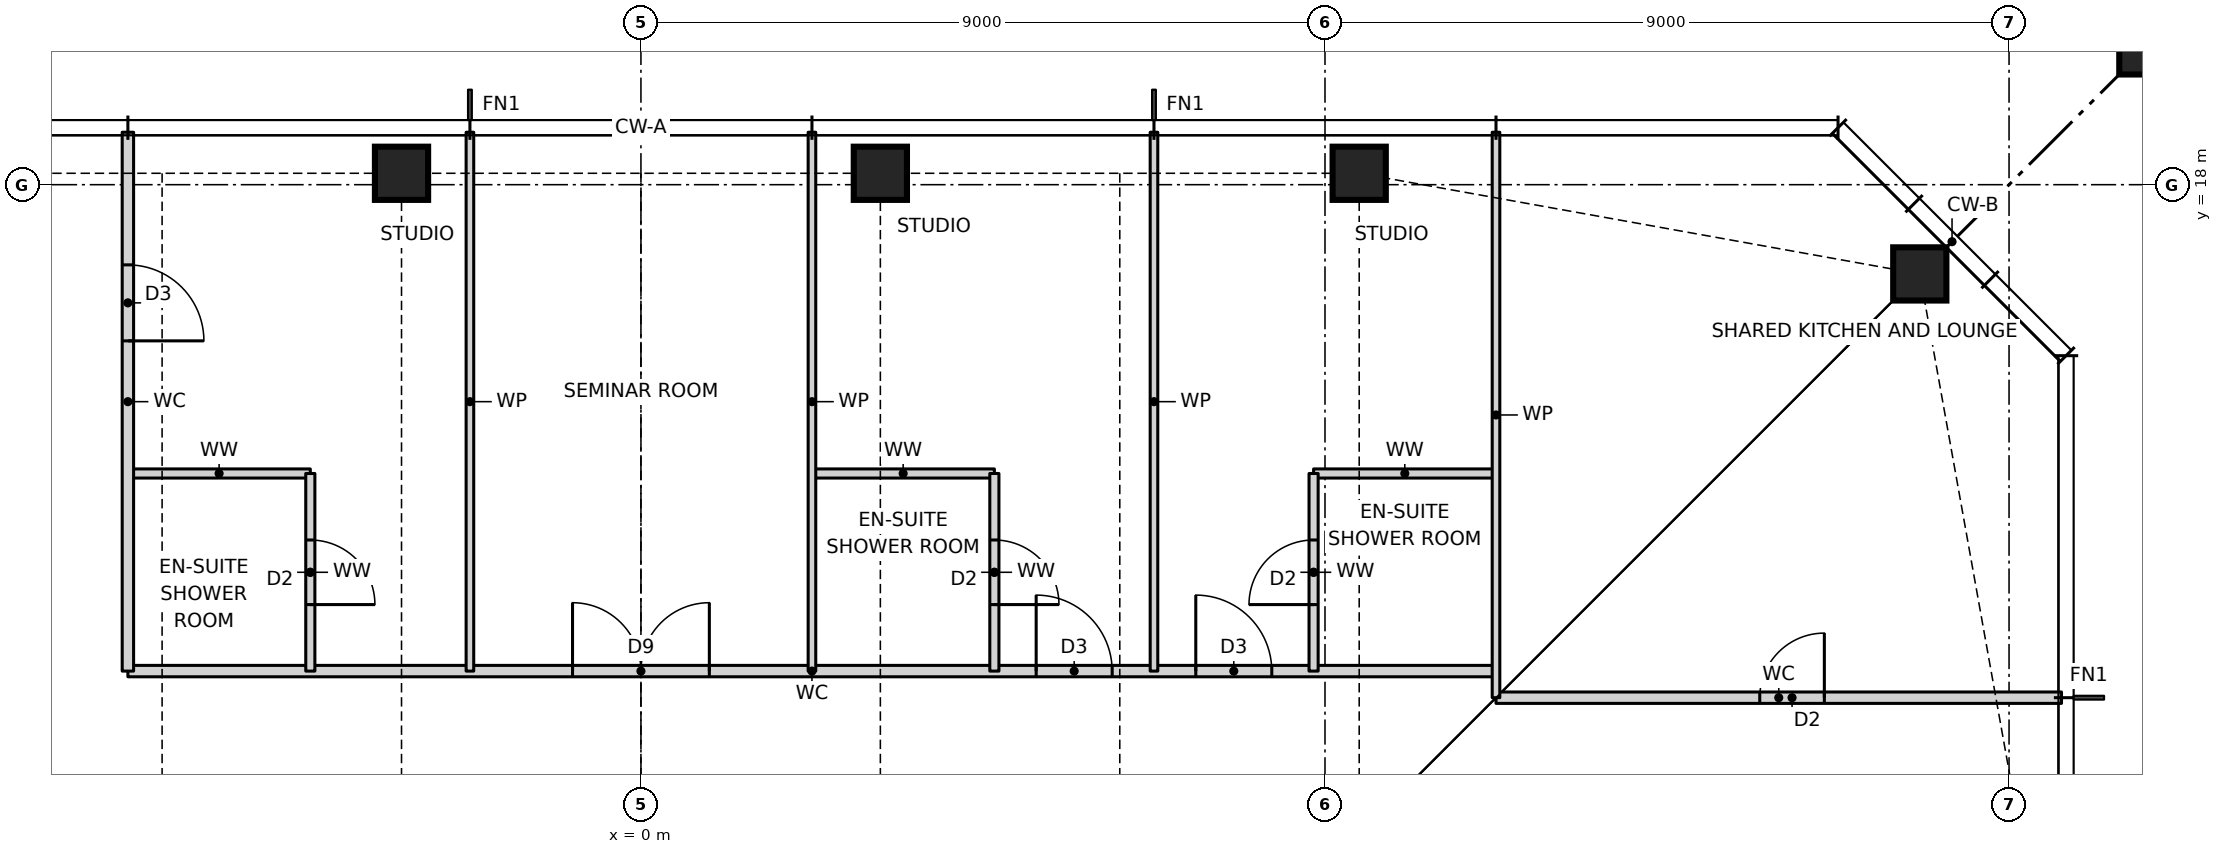
"""IFC4 building model, lengths in metres.
Left out: names, types, materials, properties, quantities, classifications, styles, units other than length and angle.
Written with IfcOpenShell. Run it as: python <this file> out.ifc"""

import sys

from ifc_helpers import new_model, si_unit, direction, frame, frame_2d, origin, origin_2d, place, context, subcontext, project, spatial, rectangle, hollow_rectangle, i_section, extrude, element, fill, save


model = new_model("IFC4")
c1 = context("Model", 3, precision=1e-05, world=origin(), true_north=direction((0.0, 1.0)))
c2 = subcontext(c1, "Body", "Model", "MODEL_VIEW")
j1 = project(units=[si_unit("LENGTHUNIT", "METRE"), si_unit("PLANEANGLEUNIT", "RADIAN")], contexts=[c1])
p1 = place(None, origin())
s1 = spatial("IfcSite", under=j1, at=p1, CompositionType="ELEMENT")
p2 = place(p1, origin())
s2 = spatial("IfcBuilding", under=s1, at=p2, CompositionType="ELEMENT")
p3 = place(p2, frame((0.0, 0.0, 153.0)))
s3 = spatial("IfcBuildingStorey", under=s2, at=p3, CompositionType="ELEMENT", Elevation=153.0)
for number, where, z_axis, x_axis in (
    (1, (16.826, 16.826, 0.0), (0.0, 0.0, 1.0), (1.0, 0.0, 0.0)),
    (2, (9.45, 18.15, 0.0), (0.0, 0.0, 1.0), (1.0, 0.0, 0.0)),
    (3, (3.15, 18.15, 0.0), (0.0, 0.0, 1.0), (1.0, 0.0, 0.0)),
    (4, (-3.15, 18.15, 0.0), (0.0, 0.0, 1.0), (1.0, 0.0, 0.0)),
):
    element("IfcColumn", number, at=place(p3, frame(where, z_axis=z_axis, x_axis=x_axis)), inside=s3, PredefinedType="COLUMN", context=c2, shape_type="SweptSolid", body=[
        extrude(hollow_rectangle(XDim=0.7, YDim=0.7, WallThickness=0.06, at=origin_2d()), origin(), (0.0, 0.0, 1.0), 3.5),
    ])
p4 = place(p3, frame((21.65, 21.65, 0.0), z_axis=(0.0, 0.0, 1.0), x_axis=(1.0, 0.0, 0.0)))
e5 = element("IfcColumn", 5, at=p4, inside=s3, PredefinedType="COLUMN", context=c2, shape_type="SweptSolid", body=[
    extrude(rectangle(XDim=4.4, YDim=4.4, at=origin_2d()), origin(), (0.0, 0.0, 1.0), 3.5),
    extrude(i_section(OverallWidth=0.478, OverallDepth=0.599, WebThickness=0.1, FlangeThickness=0.14, at=origin_2d()), origin(), (0.0, 0.0, 1.0), 3.5),
])
p5 = place(p3, frame((11.25, 11.25, 0.0), z_axis=(0.0, 0.0, 1.0), x_axis=(1.0, 0.0, 0.0)))
e6 = element("IfcWall", 6, at=p5, inside=s3, PredefinedType="PARTITIONING", context=c2, shape_type="SweptSolid", body=[
    extrude(rectangle(XDim=7.44, YDim=0.15, at=frame_2d((3.72, 0.0))), origin(), (0.0, 0.0, 1.0), 3.27),
])
p6 = place(p5, frame((3.47, 0.0, 0.0)))
e7 = element("IfcOpeningElement", 7, at=p6, cuts=e6, PredefinedType="OPENING", context=c2, shape_type="SweptSolid", body=[
    extrude(rectangle(XDim=0.85, YDim=2.1, at=frame_2d((0.425, 1.05))), frame((0.0, 0.085, 0.0), z_axis=(0.0, -1.0, 0.0), x_axis=(1.0, 0.0, 0.0)), (0.0, 0.0, 1.0), 0.17),
])
p7 = place(p3, frame((-6.75, 11.6, 0.0), z_axis=(0.0, 0.0, 1.0), x_axis=(1.0, 0.0, 0.0)))
e8 = element("IfcWall", 8, at=p7, inside=s3, PredefinedType="PARTITIONING", context=c2, shape_type="SweptSolid", body=[
    extrude(rectangle(XDim=18.0, YDim=0.15, at=frame_2d((9.0, 0.0))), origin(), (0.0, 0.0, 1.0), 3.27),
])
p8 = place(p7, frame((14.05, 0.0, 0.0)))
e9 = element("IfcOpeningElement", 9, at=p8, cuts=e8, PredefinedType="OPENING", context=c2, shape_type="SweptSolid", body=[
    extrude(rectangle(XDim=1.0, YDim=2.1, at=frame_2d((0.5, 1.05))), frame((0.0, 0.085, 0.0), z_axis=(0.0, -1.0, 0.0), x_axis=(1.0, 0.0, 0.0)), (0.0, 0.0, 1.0), 0.17),
])
p9 = place(p7, frame((11.95, 0.0, 0.0)))
e10 = element("IfcOpeningElement", 10, at=p9, cuts=e8, PredefinedType="OPENING", context=c2, shape_type="SweptSolid", body=[
    extrude(rectangle(XDim=1.0, YDim=2.1, at=frame_2d((0.5, 1.05))), frame((0.0, 0.085, 0.0), z_axis=(0.0, -1.0, 0.0), x_axis=(1.0, 0.0, 0.0)), (0.0, 0.0, 1.0), 0.17),
])
p10 = place(p7, frame((5.85, 0.0, 0.0)))
e11 = element("IfcOpeningElement", 11, at=p10, cuts=e8, PredefinedType="OPENING", context=c2, shape_type="SweptSolid", body=[
    extrude(rectangle(XDim=1.8, YDim=2.1, at=frame_2d((0.9, 1.05))), frame((0.0, 0.085, 0.0), z_axis=(0.0, -1.0, 0.0), x_axis=(1.0, 0.0, 0.0)), (0.0, 0.0, 1.0), 0.17),
])
for number, where, z_axis, x_axis in (
    (12, (-6.75, 14.2, 0.0), (0.0, 0.0, 1.0), (1.0, 0.0, 0.0)),
    (13, (2.25, 14.2, 0.0), (0.0, 0.0, 1.0), (1.0, 0.0, 0.0)),
    (14, (8.85, 14.2, 0.0), (0.0, 0.0, 1.0), (1.0, 0.0, 0.0)),
):
    element("IfcWall", number, at=place(p3, frame(where, z_axis=z_axis, x_axis=x_axis)), inside=s3, PredefinedType="PARTITIONING", context=c2, shape_type="SweptSolid", body=[
        extrude(rectangle(XDim=2.4, YDim=0.12, at=frame_2d((1.2, 0.0))), origin(), (0.0, 0.0, 1.0), 3.27),
    ])
p11 = place(p3, frame((11.25, 11.25, 0.0), z_axis=(0.0, 0.0, 1.0), x_axis=(0.0, 1.0, 0.0)))
e15 = element("IfcWall", 15, at=p11, inside=s3, PredefinedType="PARTITIONING", context=c2, shape_type="SweptSolid", body=[
    extrude(rectangle(XDim=7.44, YDim=0.1, at=frame_2d((3.72, 0.0))), origin(), (0.0, 0.0, 1.0), 3.27),
])
p12 = place(p3, frame((8.85, 11.6, 0.0), z_axis=(0.0, 0.0, 1.0), x_axis=(0.0, 1.0, 0.0)))
e16 = element("IfcWall", 16, at=p12, inside=s3, PredefinedType="PARTITIONING", context=c2, shape_type="SweptSolid", body=[
    extrude(rectangle(XDim=2.6, YDim=0.12, at=frame_2d((1.3, 0.0))), origin(), (0.0, 0.0, 1.0), 3.27),
])
p13 = place(p12, frame((0.875, 0.0, 0.0)))
e17 = element("IfcOpeningElement", 17, at=p13, cuts=e16, PredefinedType="OPENING", context=c2, shape_type="SweptSolid", body=[
    extrude(rectangle(XDim=0.85, YDim=2.1, at=frame_2d((0.425, 1.05))), frame((0.0, 0.07, 0.0), z_axis=(0.0, -1.0, 0.0), x_axis=(1.0, 0.0, 0.0)), (0.0, 0.0, 1.0), 0.14),
])
p14 = place(p3, frame((6.75, 11.6, 0.0), z_axis=(0.0, 0.0, 1.0), x_axis=(0.0, 1.0, 0.0)))
e18 = element("IfcWall", 18, at=p14, inside=s3, PredefinedType="PARTITIONING", context=c2, shape_type="SweptSolid", body=[
    extrude(rectangle(XDim=7.09, YDim=0.1, at=frame_2d((3.545, 0.0))), origin(), (0.0, 0.0, 1.0), 3.27),
])
p15 = place(p3, frame((4.65, 11.6, 0.0), z_axis=(0.0, 0.0, 1.0), x_axis=(0.0, 1.0, 0.0)))
e19 = element("IfcWall", 19, at=p15, inside=s3, PredefinedType="PARTITIONING", context=c2, shape_type="SweptSolid", body=[
    extrude(rectangle(XDim=2.6, YDim=0.12, at=frame_2d((1.3, 0.0))), origin(), (0.0, 0.0, 1.0), 3.27),
])
p16 = place(p15, frame((0.875, 0.0, 0.0)))
e20 = element("IfcOpeningElement", 20, at=p16, cuts=e19, PredefinedType="OPENING", context=c2, shape_type="SweptSolid", body=[
    extrude(rectangle(XDim=0.85, YDim=2.1, at=frame_2d((0.425, 1.05))), frame((0.0, 0.07, 0.0), z_axis=(0.0, -1.0, 0.0), x_axis=(1.0, 0.0, 0.0)), (0.0, 0.0, 1.0), 0.14),
])
for number, where, z_axis, x_axis in (
    (21, (2.25, 11.6, 0.0), (0.0, 0.0, 1.0), (0.0, 1.0, 0.0)),
    (22, (-2.25, 11.6, 0.0), (0.0, 0.0, 1.0), (0.0, 1.0, 0.0)),
):
    element("IfcWall", number, at=place(p3, frame(where, z_axis=z_axis, x_axis=x_axis)), inside=s3, PredefinedType="PARTITIONING", context=c2, shape_type="SweptSolid", body=[
        extrude(rectangle(XDim=7.09, YDim=0.1, at=frame_2d((3.545, 0.0))), origin(), (0.0, 0.0, 1.0), 3.27),
    ])
p17 = place(p3, frame((-4.35, 11.6, 0.0), z_axis=(0.0, 0.0, 1.0), x_axis=(0.0, 1.0, 0.0)))
e23 = element("IfcWall", 23, at=p17, inside=s3, PredefinedType="PARTITIONING", context=c2, shape_type="SweptSolid", body=[
    extrude(rectangle(XDim=2.6, YDim=0.12, at=frame_2d((1.3, 0.0))), origin(), (0.0, 0.0, 1.0), 3.27),
])
p18 = place(p17, frame((0.875, 0.0, 0.0)))
e24 = element("IfcOpeningElement", 24, at=p18, cuts=e23, PredefinedType="OPENING", context=c2, shape_type="SweptSolid", body=[
    extrude(rectangle(XDim=0.85, YDim=2.1, at=frame_2d((0.425, 1.05))), frame((0.0, 0.07, 0.0), z_axis=(0.0, -1.0, 0.0), x_axis=(1.0, 0.0, 0.0)), (0.0, 0.0, 1.0), 0.14),
])
p19 = place(p3, frame((-6.75, 11.6, 0.0), z_axis=(0.0, 0.0, 1.0), x_axis=(0.0, 1.0, 0.0)))
e25 = element("IfcWall", 25, at=p19, inside=s3, PredefinedType="PARTITIONING", context=c2, shape_type="SweptSolid", body=[
    extrude(rectangle(XDim=7.09, YDim=0.15, at=frame_2d((3.545, 0.0))), origin(), (0.0, 0.0, 1.0), 3.27),
])
p20 = place(p19, frame((4.345, 0.0, 0.0)))
e26 = element("IfcOpeningElement", 26, at=p20, cuts=e25, PredefinedType="OPENING", context=c2, shape_type="SweptSolid", body=[
    extrude(rectangle(XDim=1.0, YDim=2.1, at=frame_2d((0.5, 1.05))), frame((0.0, 0.085, 0.0), z_axis=(0.0, -1.0, 0.0), x_axis=(1.0, 0.0, 0.0)), (0.0, 0.0, 1.0), 0.17),
])
p21 = place(p8, origin())
e27 = element("IfcDoor", 27, at=p21, inside=s3, OperationType="SINGLE_SWING_LEFT", PredefinedType="DOOR", context=c2, shape_type="SweptSolid", body=[
    extrude(rectangle(XDim=1.0, YDim=2.1, at=frame_2d((0.5, 1.05))), frame((0.0, 0.025, 0.0), z_axis=(0.0, -1.0, 0.0), x_axis=(1.0, 0.0, 0.0)), (0.0, 0.0, 1.0), 0.05),
])
fill(e9, e27)
p22 = place(p13, origin())
e28 = element("IfcDoor", 28, at=p22, inside=s3, OperationType="SINGLE_SWING_LEFT", PredefinedType="DOOR", context=c2, shape_type="SweptSolid", body=[
    extrude(rectangle(XDim=0.85, YDim=2.1, at=frame_2d((0.425, 1.05))), frame((0.0, 0.025, 0.0), z_axis=(0.0, -1.0, 0.0), x_axis=(1.0, 0.0, 0.0)), (0.0, 0.0, 1.0), 0.05),
])
fill(e17, e28)
p23 = place(p9, origin())
e29 = element("IfcDoor", 29, at=p23, inside=s3, OperationType="SINGLE_SWING_LEFT", PredefinedType="DOOR", context=c2, shape_type="SweptSolid", body=[
    extrude(rectangle(XDim=1.0, YDim=2.1, at=frame_2d((0.5, 1.05))), frame((0.0, 0.025, 0.0), z_axis=(0.0, -1.0, 0.0), x_axis=(1.0, 0.0, 0.0)), (0.0, 0.0, 1.0), 0.05),
])
fill(e10, e29)
p24 = place(p16, frame((0.85, 0.0, 0.0), z_axis=(0.0, 0.0, 1.0), x_axis=(-1.0, 0.0, 0.0)))
e30 = element("IfcDoor", 30, at=p24, inside=s3, OperationType="SINGLE_SWING_RIGHT", PredefinedType="DOOR", context=c2, shape_type="SweptSolid", body=[
    extrude(rectangle(XDim=0.85, YDim=2.1, at=frame_2d((0.425, 1.05))), frame((0.0, 0.025, 0.0), z_axis=(0.0, -1.0, 0.0), x_axis=(1.0, 0.0, 0.0)), (0.0, 0.0, 1.0), 0.05),
])
fill(e20, e30)
p25 = place(p10, origin())
e31 = element("IfcDoor", 31, at=p25, inside=s3, OperationType="DOUBLE_DOOR_SINGLE_SWING", PredefinedType="DOOR", context=c2, shape_type="SweptSolid", body=[
    extrude(rectangle(XDim=1.8, YDim=2.1, at=frame_2d((0.9, 1.05))), frame((0.0, 0.025, 0.0), z_axis=(0.0, -1.0, 0.0), x_axis=(1.0, 0.0, 0.0)), (0.0, 0.0, 1.0), 0.05),
])
fill(e11, e31)
p26 = place(p20, frame((1.0, 0.0, 0.0), z_axis=(0.0, 0.0, 1.0), x_axis=(-1.0, 0.0, 0.0)))
e32 = element("IfcDoor", 32, at=p26, inside=s3, OperationType="SINGLE_SWING_RIGHT", PredefinedType="DOOR", context=c2, shape_type="SweptSolid", body=[
    extrude(rectangle(XDim=1.0, YDim=2.1, at=frame_2d((0.5, 1.05))), frame((0.0, 0.025, 0.0), z_axis=(0.0, -1.0, 0.0), x_axis=(1.0, 0.0, 0.0)), (0.0, 0.0, 1.0), 0.05),
])
fill(e26, e32)
p27 = place(p18, frame((0.85, 0.0, 0.0), z_axis=(0.0, 0.0, 1.0), x_axis=(-1.0, 0.0, 0.0)))
e33 = element("IfcDoor", 33, at=p27, inside=s3, OperationType="SINGLE_SWING_RIGHT", PredefinedType="DOOR", context=c2, shape_type="SweptSolid", body=[
    extrude(rectangle(XDim=0.85, YDim=2.1, at=frame_2d((0.425, 1.05))), frame((0.0, 0.025, 0.0), z_axis=(0.0, -1.0, 0.0), x_axis=(1.0, 0.0, 0.0)), (0.0, 0.0, 1.0), 0.05),
])
fill(e24, e33)
p28 = place(p6, origin())
e34 = element("IfcDoor", 34, at=p28, inside=s3, OperationType="SINGLE_SWING_RIGHT", PredefinedType="DOOR", context=c2, shape_type="SweptSolid", body=[
    extrude(rectangle(XDim=0.85, YDim=2.1, at=frame_2d((0.425, 1.05))), frame((0.0, 0.025, 0.0), z_axis=(0.0, -1.0, 0.0), x_axis=(1.0, 0.0, 0.0)), (0.0, 0.0, 1.0), 0.05),
])
fill(e7, e34)
save(model, sys.argv[1])
